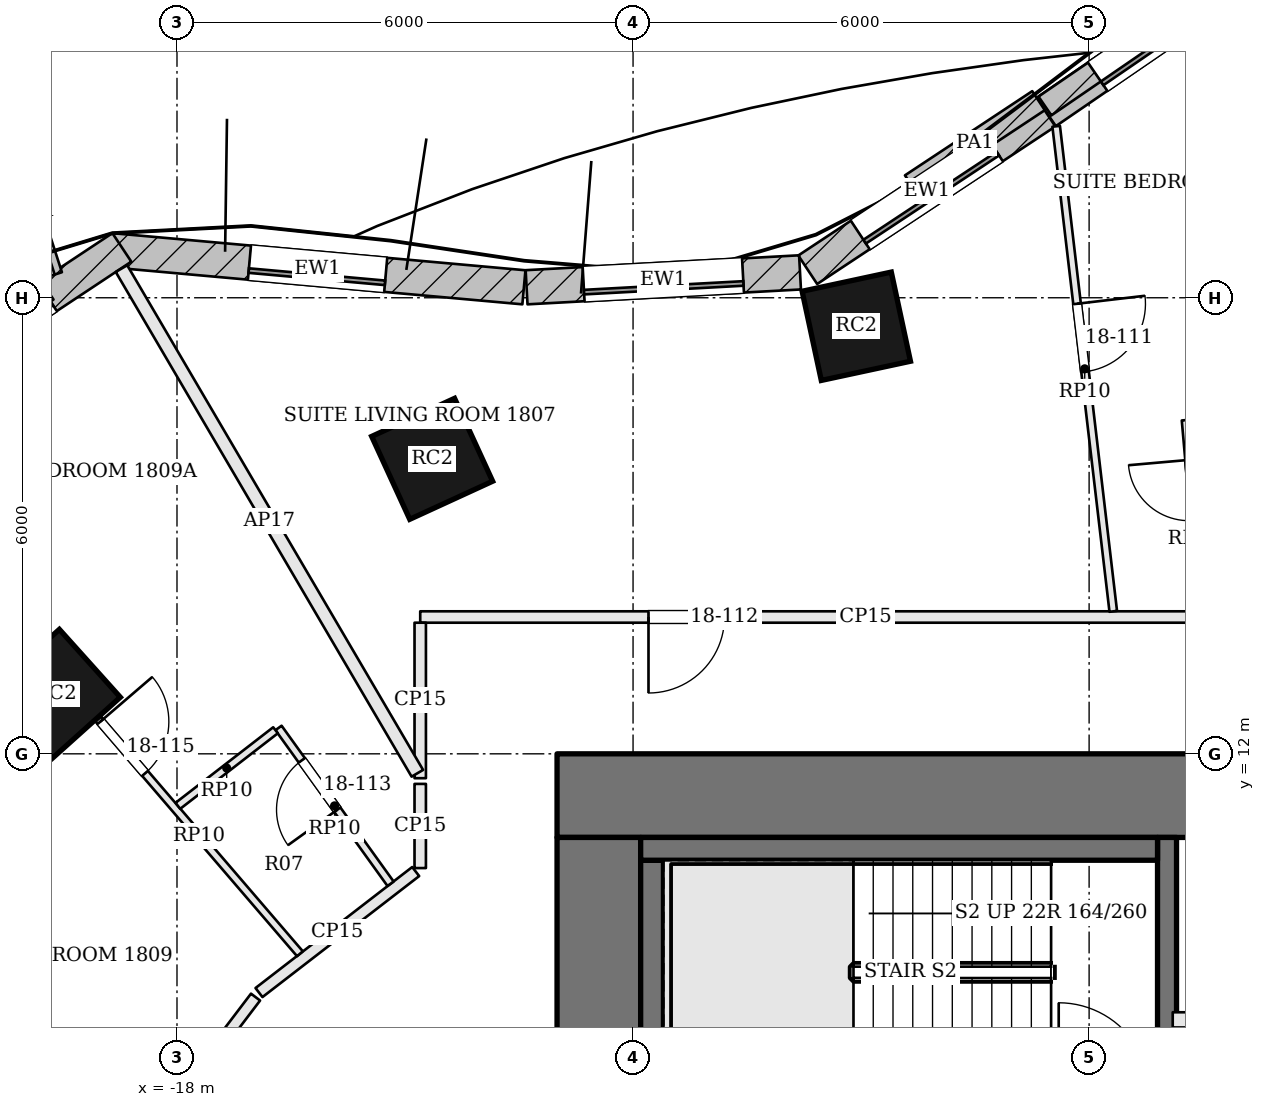
"""IFC4 building model, lengths in metres.
Left out: names, types, materials, properties, quantities, classifications, styles, units other than length and angle.
Written with IfcOpenShell. Run it as: python <this file> out.ifc"""

import sys

from ifc_helpers import new_model, si_unit, direction, frame, frame_2d, origin, origin_2d, place, context, subcontext, project, spatial, rectangle, extrude, element, fill, save


model = new_model("IFC4")
c1 = context("Model", 3, precision=1e-05, world=origin(), true_north=direction((0.0, 1.0)))
c2 = subcontext(c1, "Body", "Model", "MODEL_VIEW")
j1 = project(units=[si_unit("LENGTHUNIT", "METRE"), si_unit("PLANEANGLEUNIT", "RADIAN")], contexts=[c1])
p1 = place(None, origin())
s1 = spatial("IfcSite", under=j1, at=p1, CompositionType="ELEMENT")
p2 = place(p1, origin())
s2 = spatial("IfcBuilding", under=s1, at=p2, CompositionType="ELEMENT")
p3 = place(p2, frame((0.0, 0.0, 81.6)))
s3 = spatial("IfcBuildingStorey", under=s2, at=p3, CompositionType="ELEMENT", Elevation=81.6)
p4 = place(p3, frame((-13.0, 11.45, 0.0), z_axis=(0.0, 0.0, 1.0), x_axis=(1.0, 0.0, 0.0)))
e1 = element("IfcWall", 1, at=p4, inside=s3, PredefinedType="SHEAR", context=c2, shape_type="SweptSolid", body=[
    extrude(rectangle(XDim=26.0, YDim=1.1, at=frame_2d((13.0, 0.0))), origin(), (0.0, 0.0, 1.0), 3.6),
])
p5 = place(p4, frame((8.825, 0.0, 0.0)))
e2 = element("IfcOpeningElement", 2, at=p5, cuts=e1, PredefinedType="OPENING", context=c2, shape_type="SweptSolid", body=[
    extrude(rectangle(XDim=1.0, YDim=2.1, at=frame_2d((0.5, 1.05))), frame((0.0, 0.56, 0.0), z_axis=(0.0, -1.0, 0.0), x_axis=(1.0, 0.0, 0.0)), (0.0, 0.0, 1.0), 1.12),
])
p6 = place(p4, frame((11.275, 0.0, 0.0)))
e3 = element("IfcOpeningElement", 3, at=p6, cuts=e1, PredefinedType="OPENING", context=c2, shape_type="SweptSolid", body=[
    extrude(rectangle(XDim=1.0, YDim=2.1, at=frame_2d((0.5, 1.05))), frame((0.0, 0.56, 0.0), z_axis=(0.0, -1.0, 0.0), x_axis=(1.0, 0.0, 0.0)), (0.0, 0.0, 1.0), 1.12),
])
p7 = place(p4, frame((14.125, 0.0, 0.0)))
e4 = element("IfcOpeningElement", 4, at=p7, cuts=e1, PredefinedType="OPENING", context=c2, shape_type="SweptSolid", body=[
    extrude(rectangle(XDim=1.0, YDim=2.1, at=frame_2d((0.5, 1.05))), frame((0.0, 0.56, 0.0), z_axis=(0.0, -1.0, 0.0), x_axis=(1.0, 0.0, 0.0)), (0.0, 0.0, 1.0), 1.12),
])
p8 = place(p4, frame((16.725, 0.0, 0.0)))
e5 = element("IfcOpeningElement", 5, at=p8, cuts=e1, PredefinedType="OPENING", context=c2, shape_type="SweptSolid", body=[
    extrude(rectangle(XDim=0.7, YDim=2.1, at=frame_2d((0.35, 1.05))), frame((0.0, 0.56, 0.0), z_axis=(0.0, -1.0, 0.0), x_axis=(1.0, 0.0, 0.0)), (0.0, 0.0, 1.0), 1.12),
])
p9 = place(p3, frame((-12.45, -1.9, 0.0), z_axis=(0.0, 0.0, 1.0), x_axis=(0.0, 1.0, 0.0)))
e6 = element("IfcWall", 6, at=p9, inside=s3, PredefinedType="SHEAR", context=c2, shape_type="SweptSolid", body=[
    extrude(rectangle(XDim=12.8, YDim=1.1, at=frame_2d((6.4, 0.0))), origin(), (0.0, 0.0, 1.0), 3.6),
])
p10 = place(p9, frame((3.9, 0.0, 0.0)))
e7 = element("IfcOpeningElement", 7, at=p10, cuts=e6, PredefinedType="OPENING", context=c2, shape_type="SweptSolid", body=[
    extrude(rectangle(XDim=1.8, YDim=2.1, at=frame_2d((0.9, 1.05))), frame((0.0, 0.56, 0.0), z_axis=(0.0, -1.0, 0.0), x_axis=(1.0, 0.0, 0.0)), (0.0, 0.0, 1.0), 1.12),
])
for number, where, z_axis, x_axis in (
    (8, (-9.063, 17.625, -0.7), (0.0, 0.0, 1.0), (-0.978, -0.21, 0.0)),
    (9, (-14.643, 15.881, -0.7), (0.0, 0.0, 1.0), (-0.909, -0.417, 0.0)),
    (10, (-19.593, 12.79, -0.7), (0.0, 0.0, 1.0), (-0.744, -0.668, 0.0)),
):
    element("IfcColumn", number, at=place(p3, frame(where, z_axis=z_axis, x_axis=x_axis)), inside=s3, PredefinedType="COLUMN", context=c2, shape_type="SweptSolid", body=[
        extrude(rectangle(XDim=1.2, YDim=1.2, at=origin_2d()), origin(), (0.0, 0.0, 1.0), 4.3),
    ])
p11 = place(p3, frame((-3.479, 22.56, 0.0), z_axis=(0.0, 0.0, 1.0), x_axis=(-0.824722766417, -0.565537230033, 0.0)))
e11 = element("IfcWall", 11, at=p11, inside=s3, PredefinedType="SOLIDWALL", context=c2, shape_type="SweptSolid", body=[
    extrude(rectangle(XDim=3.742, YDim=0.45, at=frame_2d((1.871, 0.0))), origin(), (0.0, 0.0, 1.0), 3.4),
])
p12 = place(p11, frame((0.821, 0.0, 0.9)))
e12 = element("IfcOpeningElement", 12, at=p12, cuts=e11, PredefinedType="OPENING", context=c2, shape_type="SweptSolid", body=[
    extrude(rectangle(XDim=2.1, YDim=2.0, at=frame_2d((1.05, 1.0))), frame((0.0, 0.235, 0.0), z_axis=(0.0, -1.0, 0.0), x_axis=(1.0, 0.0, 0.0)), (0.0, 0.0, 1.0), 0.47),
])
p13 = place(p3, frame((-6.568, 20.441, 0.0), z_axis=(0.0, 0.0, 1.0), x_axis=(-0.834034214531, -0.551712723246, 0.0)))
e13 = element("IfcWall", 13, at=p13, inside=s3, PredefinedType="SOLIDWALL", context=c2, shape_type="SweptSolid", body=[
    extrude(rectangle(XDim=3.757, YDim=0.45, at=frame_2d((1.879, 0.0))), origin(), (0.0, 0.0, 1.0), 3.4),
])
p14 = place(p13, frame((0.829, 0.0, 0.9)))
e14 = element("IfcOpeningElement", 14, at=p14, cuts=e13, PredefinedType="OPENING", context=c2, shape_type="SweptSolid", body=[
    extrude(rectangle(XDim=2.1, YDim=2.0, at=frame_2d((1.05, 1.0))), frame((0.0, 0.235, 0.0), z_axis=(0.0, -1.0, 0.0), x_axis=(1.0, 0.0, 0.0)), (0.0, 0.0, 1.0), 0.47),
])
p15 = place(p3, frame((-9.803, 18.334, 0.0), z_axis=(0.0, 0.0, 1.0), x_axis=(-0.998525941495, -0.054276552602, 0.0)))
e15 = element("IfcWall", 15, at=p15, inside=s3, PredefinedType="SOLIDWALL", context=c2, shape_type="SweptSolid", body=[
    extrude(rectangle(XDim=3.603, YDim=0.45, at=frame_2d((1.802, 0.0))), origin(), (0.0, 0.0, 1.0), 3.4),
])
p16 = place(p15, frame((0.751, 0.0, 0.9)))
e16 = element("IfcOpeningElement", 16, at=p16, cuts=e15, PredefinedType="OPENING", context=c2, shape_type="SweptSolid", body=[
    extrude(rectangle(XDim=2.1, YDim=2.0, at=frame_2d((1.05, 1.0))), frame((0.0, 0.235, 0.0), z_axis=(0.0, -1.0, 0.0), x_axis=(1.0, 0.0, 0.0)), (0.0, 0.0, 1.0), 0.47),
])
p17 = place(p3, frame((-13.436, 18.138, 0.0), z_axis=(0.0, 0.0, 1.0), x_axis=(-0.99598810213, 0.089485755376, 0.0)))
e17 = element("IfcWall", 17, at=p17, inside=s3, PredefinedType="SOLIDWALL", context=c2, shape_type="SweptSolid", body=[
    extrude(rectangle(XDim=5.451, YDim=0.45, at=frame_2d((2.726, 0.0))), origin(), (0.0, 0.0, 1.0), 3.4),
])
p18 = place(p17, frame((1.825, 0.0, 0.9)))
e18 = element("IfcOpeningElement", 18, at=p18, cuts=e17, PredefinedType="OPENING", context=c2, shape_type="SweptSolid", body=[
    extrude(rectangle(XDim=1.8, YDim=2.0, at=frame_2d((0.9, 1.0))), frame((0.0, 0.235, 0.0), z_axis=(0.0, -1.0, 0.0), x_axis=(1.0, 0.0, 0.0)), (0.0, 0.0, 1.0), 0.47),
])
p19 = place(p3, frame((-18.726, 18.663, 0.0), z_axis=(0.0, 0.0, 1.0), x_axis=(-0.83333921474, -0.552761931736, 0.0)))
e19 = element("IfcWall", 19, at=p19, inside=s3, PredefinedType="SOLIDWALL", context=c2, shape_type="SweptSolid", body=[
    extrude(rectangle(XDim=4.451, YDim=0.45, at=frame_2d((2.225, 0.0))), origin(), (0.0, 0.0, 1.0), 3.4),
])
p20 = place(p19, frame((1.175, 0.0, 0.9)))
e20 = element("IfcOpeningElement", 20, at=p20, cuts=e19, PredefinedType="OPENING", context=c2, shape_type="SweptSolid", body=[
    extrude(rectangle(XDim=2.1, YDim=2.0, at=frame_2d((1.05, 1.0))), frame((0.0, 0.235, 0.0), z_axis=(0.0, -1.0, 0.0), x_axis=(1.0, 0.0, 0.0)), (0.0, 0.0, 1.0), 0.47),
])
p21 = place(p3, frame((-19.609, 18.305, 0.0), z_axis=(0.0, 0.0, 1.0), x_axis=(-0.308600224758, 0.951191832008, 0.0)))
e21 = element("IfcWall", 21, at=p21, inside=s3, PredefinedType="SOLIDWALL", context=c2, shape_type="SweptSolid", body=[
    extrude(rectangle(XDim=1.75, YDim=0.2, at=frame_2d((0.875, 0.0))), origin(), (0.0, 0.0, 1.0), 3.4),
])
p22 = place(p3, frame((-3.599, 22.568, 3.6), z_axis=(0.0, 0.0, 1.0), x_axis=(-0.82476034254, -0.565482428881, 0.0)))
e22 = element("IfcWall", 22, at=p22, inside=s3, PredefinedType="PARAPET", context=c2, shape_type="SweptSolid", body=[
    extrude(rectangle(XDim=3.616, YDim=0.3, at=frame_2d((1.808, 0.0))), origin(), (0.0, 0.0, 1.0), 1.1),
])
p23 = place(p3, frame((-6.665, 20.593, 3.6), z_axis=(0.0, 0.0, 1.0), x_axis=(-0.834027642059, -0.551722658843, 0.0)))
e23 = element("IfcWall", 23, at=p23, inside=s3, PredefinedType="PARAPET", context=c2, shape_type="SweptSolid", body=[
    extrude(rectangle(XDim=2.008, YDim=0.3, at=frame_2d((1.004, 0.0))), origin(), (0.0, 0.0, 1.0), 1.1),
])
p24 = place(p3, frame((-19.708, 18.101, 3.6), z_axis=(0.0, 0.0, 1.0), x_axis=(-0.833370664286, -0.552714515738, 0.0)))
e24 = element("IfcWall", 24, at=p24, inside=s3, PredefinedType="PARAPET", context=c2, shape_type="SweptSolid", body=[
    extrude(rectangle(XDim=3.18, YDim=0.3, at=frame_2d((1.59, 0.0))), origin(), (0.0, 0.0, 1.0), 1.1),
])
p25 = place(p3, frame((-4.975, -1.9, 0.0), z_axis=(0.0, 0.0, 1.0), x_axis=(0.0, 1.0, 0.0)))
e25 = element("IfcWall", 25, at=p25, inside=s3, PredefinedType="SOLIDWALL", context=c2, shape_type="SweptSolid", body=[
    extrude(rectangle(XDim=12.8, YDim=0.25, at=frame_2d((6.4, 0.0))), origin(), (0.0, 0.0, 1.0), 3.4),
])
p26 = place(p25, frame((4.95, 0.0, 0.0)))
e26 = element("IfcOpeningElement", 26, at=p26, cuts=e25, PredefinedType="OPENING", context=c2, shape_type="SweptSolid", body=[
    extrude(rectangle(XDim=1.2, YDim=2.1, at=frame_2d((0.6, 1.05))), frame((0.0, 0.135, 0.0), z_axis=(0.0, -1.0, 0.0), x_axis=(1.0, 0.0, 0.0)), (0.0, 0.0, 1.0), 0.27),
])
p27 = place(p3, frame((-11.75, 7.65, 0.0), z_axis=(0.0, 0.0, 1.0), x_axis=(0.0, 1.0, 0.0)))
e27 = element("IfcWall", 27, at=p27, inside=s3, PredefinedType="SOLIDWALL", context=c2, shape_type="SweptSolid", body=[
    extrude(rectangle(XDim=2.95, YDim=0.3, at=frame_2d((1.475, 0.0))), origin(), (0.0, 0.0, 1.0), 3.4),
])
p28 = place(p3, frame((-11.9, 10.75, 0.0), z_axis=(0.0, 0.0, 1.0), x_axis=(1.0, 0.0, 0.0)))
e28 = element("IfcWall", 28, at=p28, inside=s3, PredefinedType="SOLIDWALL", context=c2, shape_type="SweptSolid", body=[
    extrude(rectangle(XDim=6.8, YDim=0.3, at=frame_2d((3.4, 0.0))), origin(), (0.0, 0.0, 1.0), 3.4),
])
p29 = place(p3, frame((-4.9, 8.5, 0.0), z_axis=(0.0, 0.0, 1.0), x_axis=(1.0, 0.0, 0.0)))
e29 = element("IfcWall", 29, at=p29, inside=s3, PredefinedType="SOLIDWALL", context=c2, shape_type="SweptSolid", body=[
    extrude(rectangle(XDim=9.8, YDim=0.2, at=frame_2d((4.9, 0.0))), origin(), (0.0, 0.0, 1.0), 3.4),
])
p30 = place(p3, frame((-3.078, 13.8, 0.0), z_axis=(0.0, 0.0, 1.0), x_axis=(-1.0, 0.0, 0.0)))
e30 = element("IfcWall", 30, at=p30, inside=s3, PredefinedType="PARTITIONING", context=c2, shape_type="SweptSolid", body=[
    extrude(rectangle(XDim=11.722, YDim=0.15, at=frame_2d((5.861, 0.0))), origin(), (0.0, 0.0, 1.0), 2.784),
])
p31 = place(p30, frame((7.719, 0.0, 0.0)))
e31 = element("IfcOpeningElement", 31, at=p31, cuts=e30, PredefinedType="OPENING", context=c2, shape_type="SweptSolid", body=[
    extrude(rectangle(XDim=1.0, YDim=2.1, at=frame_2d((0.5, 1.05))), frame((0.0, 0.085, 0.0), z_axis=(0.0, -1.0, 0.0), x_axis=(1.0, 0.0, 0.0)), (0.0, 0.0, 1.0), 0.17),
])
p32 = place(p3, frame((-14.8, 13.725, 0.0), z_axis=(0.0, 0.0, 1.0), x_axis=(0.0, -1.0, 0.0)))
e32 = element("IfcWall", 32, at=p32, inside=s3, PredefinedType="PARTITIONING", context=c2, shape_type="SweptSolid", body=[
    extrude(rectangle(XDim=2.046, YDim=0.15, at=frame_2d((1.023, 0.0))), origin(), (0.0, 0.0, 1.0), 2.784),
])
p33 = place(p3, frame((-18.73, 18.384, 0.0), z_axis=(0.0, 0.0, 1.0), x_axis=(0.505731710935, -0.862690811679, 0.0)))
e33 = element("IfcWall", 33, at=p33, inside=s3, PredefinedType="PARTITIONING", context=c2, shape_type="SweptSolid", body=[
    extrude(rectangle(XDim=7.697, YDim=0.175, at=frame_2d((3.848, 0.0))), origin(), (0.0, 0.0, 1.0), 2.784),
])
p34 = place(p3, frame((-14.8, 11.604, 0.0), z_axis=(0.0, 0.0, 1.0), x_axis=(0.0, -1.0, 0.0)))
e34 = element("IfcWall", 34, at=p34, inside=s3, PredefinedType="PARTITIONING", context=c2, shape_type="SweptSolid", body=[
    extrude(rectangle(XDim=1.107, YDim=0.15, at=frame_2d((0.554, 0.0))), origin(), (0.0, 0.0, 1.0), 2.784),
])
p35 = place(p3, frame((-14.86, 10.451, 0.0), z_axis=(0.0, 0.0, 1.0), x_axis=(-0.791542595332, -0.611113999001, 0.0)))
e35 = element("IfcWall", 35, at=p35, inside=s3, PredefinedType="PARTITIONING", context=c2, shape_type="SweptSolid", body=[
    extrude(rectangle(XDim=2.605, YDim=0.15, at=frame_2d((1.302, 0.0))), origin(), (0.0, 0.0, 1.0), 2.784),
])
p36 = place(p3, frame((-16.967, 8.8, 0.0), z_axis=(0.0, 0.0, 1.0), x_axis=(-0.604991921991, -0.796231608469, 0.0)))
e36 = element("IfcWall", 36, at=p36, inside=s3, PredefinedType="PARTITIONING", context=c2, shape_type="SweptSolid", body=[
    extrude(rectangle(XDim=3.185, YDim=0.15, at=frame_2d((1.593, 0.0))), origin(), (0.0, 0.0, 1.0), 2.784),
])
p37 = place(p36, frame((1.75, 0.0, 0.0)))
e37 = element("IfcOpeningElement", 37, at=p37, cuts=e36, PredefinedType="OPENING", context=c2, shape_type="SweptSolid", body=[
    extrude(rectangle(XDim=1.0, YDim=2.1, at=frame_2d((0.5, 1.05))), frame((0.0, 0.085, 0.0), z_axis=(0.0, -1.0, 0.0), x_axis=(1.0, 0.0, 0.0)), (0.0, 0.0, 1.0), 0.17),
])
p38 = place(p3, frame((-6.433, 20.256, 0.0), z_axis=(0.0, 0.0, 1.0), x_axis=(0.116872110209, -0.993146972938, 0.0)))
e38 = element("IfcWall", 38, at=p38, inside=s3, PredefinedType="PARTITIONING", context=c2, shape_type="SweptSolid", body=[
    extrude(rectangle(XDim=6.426, YDim=0.1, at=frame_2d((3.213, 0.0))), origin(), (0.0, 0.0, 1.0), 2.784),
])
p39 = place(p38, frame((2.351, 0.0, 0.0)))
e39 = element("IfcOpeningElement", 39, at=p39, cuts=e38, PredefinedType="OPENING", context=c2, shape_type="SweptSolid", body=[
    extrude(rectangle(XDim=0.9, YDim=2.4, at=frame_2d((0.45, 1.2))), frame((0.0, 0.06, 0.0), z_axis=(0.0, -1.0, 0.0), x_axis=(1.0, 0.0, 0.0)), (0.0, 0.0, 1.0), 0.12),
])
p40 = place(p3, frame((-4.51, 13.875, 0.0), z_axis=(0.0, 0.0, 1.0), x_axis=(-0.087797863197, 0.996138311289, 0.0)))
e40 = element("IfcWall", 40, at=p40, inside=s3, PredefinedType="PARTITIONING", context=c2, shape_type="SweptSolid", body=[
    extrude(rectangle(XDim=2.525, YDim=0.1, at=frame_2d((1.262, 0.0))), origin(), (0.0, 0.0, 1.0), 2.784),
])
p41 = place(p40, frame((1.2, 0.0, 0.0)))
e41 = element("IfcOpeningElement", 41, at=p41, cuts=e40, PredefinedType="OPENING", context=c2, shape_type="SweptSolid", body=[
    extrude(rectangle(XDim=0.8, YDim=2.1, at=frame_2d((0.4, 1.05))), frame((0.0, 0.06, 0.0), z_axis=(0.0, -1.0, 0.0), x_axis=(1.0, 0.0, 0.0)), (0.0, 0.0, 1.0), 0.12),
])
p42 = place(p3, frame((-19.035, 12.458, 0.0), z_axis=(0.0, 0.0, 1.0), x_axis=(0.651615806177, -0.758549168571, 0.0)))
e42 = element("IfcWall", 42, at=p42, inside=s3, PredefinedType="PARTITIONING", context=c2, shape_type="SweptSolid", body=[
    extrude(rectangle(XDim=4.071, YDim=0.1, at=frame_2d((2.035, 0.0))), origin(), (0.0, 0.0, 1.0), 2.784),
])
p43 = place(p42, frame((0.043, 0.0, 0.0)))
e43 = element("IfcOpeningElement", 43, at=p43, cuts=e42, PredefinedType="OPENING", context=c2, shape_type="SweptSolid", body=[
    extrude(rectangle(XDim=0.9, YDim=2.4, at=frame_2d((0.45, 1.2))), frame((0.0, 0.06, 0.0), z_axis=(0.0, -1.0, 0.0), x_axis=(1.0, 0.0, 0.0)), (0.0, 0.0, 1.0), 0.12),
])
p44 = place(p3, frame((-15.19, 10.291, 0.0), z_axis=(0.0, 0.0, 1.0), x_axis=(-0.583805380482, 0.81189363695, 0.0)))
e44 = element("IfcWall", 44, at=p44, inside=s3, PredefinedType="PARTITIONING", context=c2, shape_type="SweptSolid", body=[
    extrude(rectangle(XDim=2.525, YDim=0.1, at=frame_2d((1.262, 0.0))), origin(), (0.0, 0.0, 1.0), 2.784),
])
p45 = place(p44, frame((1.2, 0.0, 0.0)))
e45 = element("IfcOpeningElement", 45, at=p45, cuts=e44, PredefinedType="OPENING", context=c2, shape_type="SweptSolid", body=[
    extrude(rectangle(XDim=0.8, YDim=2.1, at=frame_2d((0.4, 1.05))), frame((0.0, 0.06, 0.0), z_axis=(0.0, -1.0, 0.0), x_axis=(1.0, 0.0, 0.0)), (0.0, 0.0, 1.0), 0.12),
])
p46 = place(p3, frame((-16.704, 12.31, 0.0), z_axis=(0.0, 0.0, 1.0), x_axis=(-0.790798809465, -0.612076174139, 0.0)))
e46 = element("IfcWall", 46, at=p46, inside=s3, PredefinedType="PARTITIONING", context=c2, shape_type="SweptSolid", body=[
    extrude(rectangle(XDim=1.624, YDim=0.1, at=frame_2d((0.812, 0.0))), origin(), (0.0, 0.0, 1.0), 2.784),
])
p47 = place(p12, origin())
e47 = element("IfcWindow", 47, at=p47, inside=s3, PartitioningType="SINGLE_PANEL", PredefinedType="WINDOW", context=c2, shape_type="SweptSolid", body=[
    extrude(rectangle(XDim=2.1, YDim=2.0, at=frame_2d((1.05, 1.0))), frame((0.0, 0.135, 0.0), z_axis=(0.0, -1.0, 0.0), x_axis=(1.0, 0.0, 0.0)), (0.0, 0.0, 1.0), 0.06),
])
fill(e12, e47)
p48 = place(p14, origin())
e48 = element("IfcWindow", 48, at=p48, inside=s3, PartitioningType="SINGLE_PANEL", PredefinedType="WINDOW", context=c2, shape_type="SweptSolid", body=[
    extrude(rectangle(XDim=2.1, YDim=2.0, at=frame_2d((1.05, 1.0))), frame((0.0, 0.135, 0.0), z_axis=(0.0, -1.0, 0.0), x_axis=(1.0, 0.0, 0.0)), (0.0, 0.0, 1.0), 0.06),
])
fill(e14, e48)
p49 = place(p16, origin())
e49 = element("IfcWindow", 49, at=p49, inside=s3, PartitioningType="SINGLE_PANEL", PredefinedType="WINDOW", context=c2, shape_type="SweptSolid", body=[
    extrude(rectangle(XDim=2.1, YDim=2.0, at=frame_2d((1.05, 1.0))), frame((0.0, 0.135, 0.0), z_axis=(0.0, -1.0, 0.0), x_axis=(1.0, 0.0, 0.0)), (0.0, 0.0, 1.0), 0.06),
])
fill(e16, e49)
p50 = place(p18, origin())
e50 = element("IfcWindow", 50, at=p50, inside=s3, PartitioningType="SINGLE_PANEL", PredefinedType="WINDOW", context=c2, shape_type="SweptSolid", body=[
    extrude(rectangle(XDim=1.8, YDim=2.0, at=frame_2d((0.9, 1.0))), frame((0.0, 0.135, 0.0), z_axis=(0.0, -1.0, 0.0), x_axis=(1.0, 0.0, 0.0)), (0.0, 0.0, 1.0), 0.06),
])
fill(e18, e50)
p51 = place(p20, origin())
e51 = element("IfcWindow", 51, at=p51, inside=s3, PartitioningType="SINGLE_PANEL", PredefinedType="WINDOW", context=c2, shape_type="SweptSolid", body=[
    extrude(rectangle(XDim=2.1, YDim=2.0, at=frame_2d((1.05, 1.0))), frame((0.0, 0.135, 0.0), z_axis=(0.0, -1.0, 0.0), x_axis=(1.0, 0.0, 0.0)), (0.0, 0.0, 1.0), 0.06),
])
fill(e20, e51)
p52 = place(p39, origin())
e52 = element("IfcDoor", 52, at=p52, inside=s3, OperationType="SINGLE_SWING_LEFT", PredefinedType="DOOR", context=c2, shape_type="SweptSolid", body=[
    extrude(rectangle(XDim=0.9, YDim=2.4, at=frame_2d((0.45, 1.2))), frame((0.0, 0.025, 0.0), z_axis=(0.0, -1.0, 0.0), x_axis=(1.0, 0.0, 0.0)), (0.0, 0.0, 1.0), 0.05),
])
fill(e39, e52)
p53 = place(p31, origin())
e53 = element("IfcDoor", 53, at=p53, inside=s3, OperationType="SINGLE_SWING_RIGHT", PredefinedType="DOOR", context=c2, shape_type="SweptSolid", body=[
    extrude(rectangle(XDim=1.0, YDim=2.1, at=frame_2d((0.5, 1.05))), frame((0.0, 0.025, 0.0), z_axis=(0.0, -1.0, 0.0), x_axis=(1.0, 0.0, 0.0)), (0.0, 0.0, 1.0), 0.05),
])
fill(e31, e53)
p54 = place(p45, origin())
e54 = element("IfcDoor", 54, at=p54, inside=s3, OperationType="SINGLE_SWING_LEFT", PredefinedType="DOOR", context=c2, shape_type="SweptSolid", body=[
    extrude(rectangle(XDim=0.8, YDim=2.1, at=frame_2d((0.4, 1.05))), frame((0.0, 0.025, 0.0), z_axis=(0.0, -1.0, 0.0), x_axis=(1.0, 0.0, 0.0)), (0.0, 0.0, 1.0), 0.05),
])
fill(e45, e54)
p55 = place(p43, origin())
e55 = element("IfcDoor", 55, at=p55, inside=s3, OperationType="SINGLE_SWING_LEFT", PredefinedType="DOOR", context=c2, shape_type="SweptSolid", body=[
    extrude(rectangle(XDim=0.9, YDim=2.4, at=frame_2d((0.45, 1.2))), frame((0.0, 0.025, 0.0), z_axis=(0.0, -1.0, 0.0), x_axis=(1.0, 0.0, 0.0)), (0.0, 0.0, 1.0), 0.05),
])
fill(e43, e55)
save(model, sys.argv[1])
